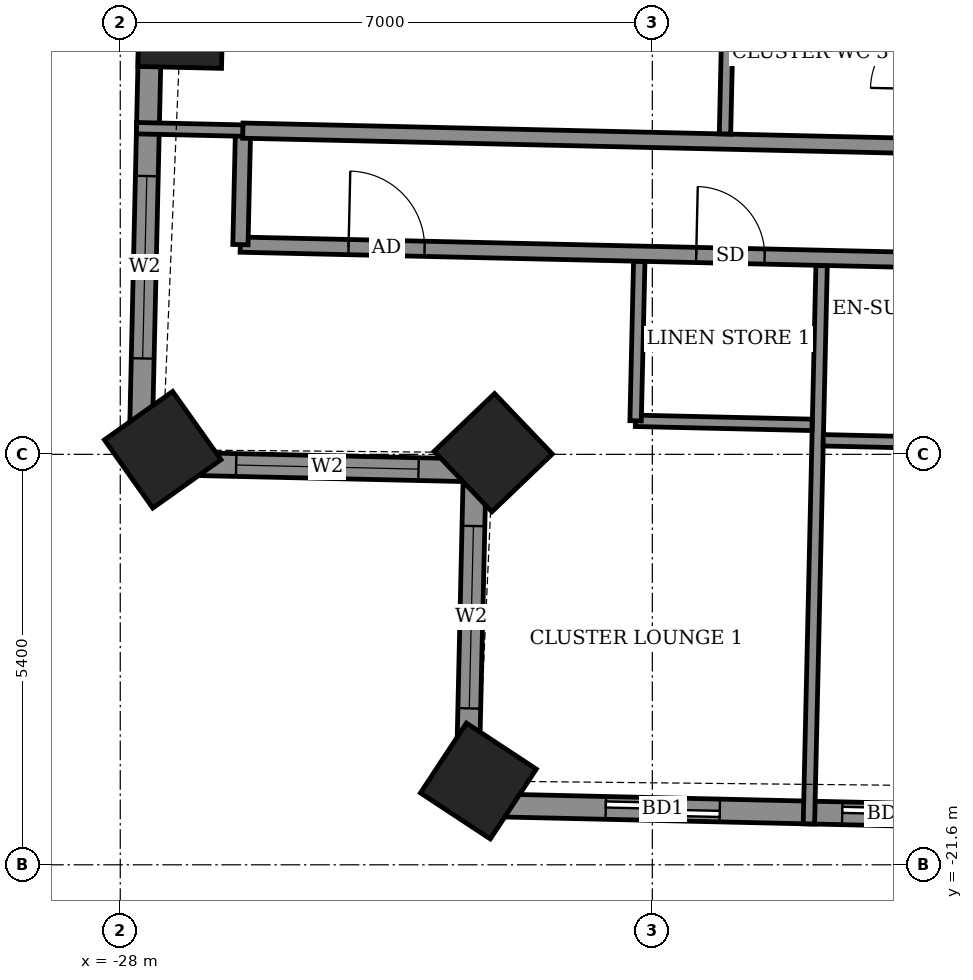
"""IFC4 building model, lengths in metres.
Left out: names, types, materials, properties, quantities, classifications, styles, units other than length and angle.
Written with IfcOpenShell. Run it as: python <this file> out.ifc"""

import sys

from ifc_helpers import new_model, si_unit, direction, frame, frame_2d, origin, origin_2d, place, context, subcontext, project, spatial, rectangle, extrude, element, fill, save


model = new_model("IFC4")
c1 = context("Model", 3, precision=1e-05, world=origin(), true_north=direction((0.0, 1.0)))
c2 = subcontext(c1, "Body", "Model", "MODEL_VIEW")
j1 = project(units=[si_unit("LENGTHUNIT", "METRE"), si_unit("PLANEANGLEUNIT", "RADIAN")], contexts=[c1])
p1 = place(None, origin())
s1 = spatial("IfcSite", under=j1, at=p1, CompositionType="ELEMENT")
p2 = place(p1, origin())
s2 = spatial("IfcBuilding", under=s1, at=p2, CompositionType="ELEMENT")
p3 = place(p2, frame((0.0, 0.0, 212.3)))
s3 = spatial("IfcBuildingStorey", under=s2, at=p3, CompositionType="ELEMENT", Elevation=212.3)
for number, where, z_axis, x_axis in (
    (1, (-27.205, -10.56, -0.55), (0.0, 0.0, 1.0), (-0.023, -1.0, 0.0)),
    (2, (-27.441, -16.14, -0.55), (0.0, 0.0, 1.0), (0.579, -0.816, 0.0)),
    (3, (-23.093, -16.178, -0.55), (0.0, 0.0, 1.0), (0.691, -0.723, 0.0)),
    (4, (-23.289, -20.498, -0.55), (0.0, 0.0, 1.0), (0.835, -0.55, 0.0)),
):
    element("IfcColumn", number, at=place(p3, frame(where, z_axis=z_axis, x_axis=x_axis)), inside=s3, PredefinedType="COLUMN", context=c2, shape_type="SweptSolid", body=[
        extrude(rectangle(XDim=1.1, YDim=1.1, at=origin_2d()), origin(), (0.0, 0.0, 1.0), 3.6),
    ])
p4 = place(p3, frame((-27.459, -4.091, 0.0), z_axis=(0.0, 0.0, 1.0), x_axis=(-0.022668325129, -0.999743040504, 0.0)))
e5 = element("IfcWall", 5, at=p4, inside=s3, PredefinedType="SOLIDWALL", context=c2, shape_type="SweptSolid", body=[
    extrude(rectangle(XDim=12.224, YDim=0.3, at=frame_2d((6.112, 0.0))), origin(), (0.0, 0.0, 1.0), 2.55),
])
p5 = place(p4, frame((1.462, 0.0, 0.0)))
e6 = element("IfcOpeningElement", 6, at=p5, cuts=e5, PredefinedType="OPENING", context=c2, shape_type="SweptSolid", body=[
    extrude(rectangle(XDim=1.5, YDim=2.4, at=frame_2d((0.75, 1.2))), frame((0.0, 0.16, 0.0), z_axis=(0.0, -1.0, 0.0), x_axis=(1.0, 0.0, 0.0)), (0.0, 0.0, 1.0), 0.32),
])
p6 = place(p4, frame((4.243, 0.0, 0.9)))
e7 = element("IfcOpeningElement", 7, at=p6, cuts=e5, PredefinedType="OPENING", context=c2, shape_type="SweptSolid", body=[
    extrude(rectangle(XDim=1.2, YDim=1.5, at=frame_2d((0.6, 0.75))), frame((0.0, 0.16, 0.0), z_axis=(0.0, -1.0, 0.0), x_axis=(1.0, 0.0, 0.0)), (0.0, 0.0, 1.0), 0.32),
])
p7 = place(p4, frame((8.45, 0.0, 0.9)))
e8 = element("IfcOpeningElement", 8, at=p7, cuts=e5, PredefinedType="OPENING", context=c2, shape_type="SweptSolid", body=[
    extrude(rectangle(XDim=2.4, YDim=1.5, at=frame_2d((1.2, 0.75))), frame((0.0, 0.16, 0.0), z_axis=(0.0, -1.0, 0.0), x_axis=(1.0, 0.0, 0.0)), (0.0, 0.0, 1.0), 0.32),
])
p8 = place(p3, frame((-27.736, -16.312, 0.0), z_axis=(0.0, 0.0, 1.0), x_axis=(0.999747504193, -0.022470599878, 0.0)))
e9 = element("IfcWall", 9, at=p8, inside=s3, PredefinedType="SOLIDWALL", context=c2, shape_type="SweptSolid", body=[
    extrude(rectangle(XDim=4.4, YDim=0.3, at=frame_2d((2.2, 0.0))), origin(), (0.0, 0.0, 1.0), 2.55),
])
p9 = place(p8, frame((1.261, 0.0, 0.9)))
e10 = element("IfcOpeningElement", 10, at=p9, cuts=e9, PredefinedType="OPENING", context=c2, shape_type="SweptSolid", body=[
    extrude(rectangle(XDim=2.4, YDim=1.5, at=frame_2d((1.2, 0.75))), frame((0.0, 0.16, 0.0), z_axis=(0.0, -1.0, 0.0), x_axis=(1.0, 0.0, 0.0)), (0.0, 0.0, 1.0), 0.32),
])
p10 = place(p3, frame((-23.337, -16.411, 0.0), z_axis=(0.0, 0.0, 1.0), x_axis=(-0.022747872013, -0.999741233679, 0.0)))
e11 = element("IfcWall", 11, at=p10, inside=s3, PredefinedType="SOLIDWALL", context=c2, shape_type="SweptSolid", body=[
    extrude(rectangle(XDim=4.4, YDim=0.3, at=frame_2d((2.2, 0.0))), origin(), (0.0, 0.0, 1.0), 2.55),
])
p11 = place(p10, frame((0.732, 0.0, 0.9)))
e12 = element("IfcOpeningElement", 12, at=p11, cuts=e11, PredefinedType="OPENING", context=c2, shape_type="SweptSolid", body=[
    extrude(rectangle(XDim=2.4, YDim=1.5, at=frame_2d((1.2, 0.75))), frame((0.0, 0.16, 0.0), z_axis=(0.0, -1.0, 0.0), x_axis=(1.0, 0.0, 0.0)), (0.0, 0.0, 1.0), 0.32),
])
p12 = place(p3, frame((-23.437, -20.81, 0.0), z_axis=(0.0, 0.0, 1.0), x_axis=(0.999742269115, -0.022702320244, 0.0)))
e13 = element("IfcWall", 13, at=p12, inside=s3, PredefinedType="SOLIDWALL", context=c2, shape_type="SweptSolid", body=[
    extrude(rectangle(XDim=41.844, YDim=0.3, at=frame_2d((20.922, 0.0))), origin(), (0.0, 0.0, 1.0), 2.55),
])
p13 = place(p12, frame((1.825, 0.0, 0.0)))
e14 = element("IfcOpeningElement", 14, at=p13, cuts=e13, PredefinedType="OPENING", context=c2, shape_type="SweptSolid", body=[
    extrude(rectangle(XDim=1.5, YDim=2.4, at=frame_2d((0.75, 1.2))), frame((0.0, 0.16, 0.0), z_axis=(0.0, -1.0, 0.0), x_axis=(1.0, 0.0, 0.0)), (0.0, 0.0, 1.0), 0.32),
])
p14 = place(p12, frame((4.937, 0.0, 0.0)))
e15 = element("IfcOpeningElement", 15, at=p14, cuts=e13, PredefinedType="OPENING", context=c2, shape_type="SweptSolid", body=[
    extrude(rectangle(XDim=1.2, YDim=2.4, at=frame_2d((0.6, 1.2))), frame((0.0, 0.16, 0.0), z_axis=(0.0, -1.0, 0.0), x_axis=(1.0, 0.0, 0.0)), (0.0, 0.0, 1.0), 0.32),
])
p15 = place(p12, frame((10.3, 0.0, 0.0)))
e16 = element("IfcOpeningElement", 16, at=p15, cuts=e13, PredefinedType="OPENING", context=c2, shape_type="SweptSolid", body=[
    extrude(rectangle(XDim=1.5, YDim=2.4, at=frame_2d((0.75, 1.2))), frame((0.0, 0.16, 0.0), z_axis=(0.0, -1.0, 0.0), x_axis=(1.0, 0.0, 0.0)), (0.0, 0.0, 1.0), 0.32),
])
p16 = place(p12, frame((15.224, 0.0, 0.0)))
e17 = element("IfcOpeningElement", 17, at=p16, cuts=e13, PredefinedType="OPENING", context=c2, shape_type="SweptSolid", body=[
    extrude(rectangle(XDim=1.5, YDim=2.4, at=frame_2d((0.75, 1.2))), frame((0.0, 0.16, 0.0), z_axis=(0.0, -1.0, 0.0), x_axis=(1.0, 0.0, 0.0)), (0.0, 0.0, 1.0), 0.32),
])
p17 = place(p12, frame((18.436, 0.0, 0.0)))
e18 = element("IfcOpeningElement", 18, at=p17, cuts=e13, PredefinedType="OPENING", context=c2, shape_type="SweptSolid", body=[
    extrude(rectangle(XDim=1.5, YDim=2.4, at=frame_2d((0.75, 1.2))), frame((0.0, 0.16, 0.0), z_axis=(0.0, -1.0, 0.0), x_axis=(1.0, 0.0, 0.0)), (0.0, 0.0, 1.0), 0.32),
])
p18 = place(p12, frame((23.825, 0.0, 0.0)))
e19 = element("IfcOpeningElement", 19, at=p18, cuts=e13, PredefinedType="OPENING", context=c2, shape_type="SweptSolid", body=[
    extrude(rectangle(XDim=1.5, YDim=2.4, at=frame_2d((0.75, 1.2))), frame((0.0, 0.16, 0.0), z_axis=(0.0, -1.0, 0.0), x_axis=(1.0, 0.0, 0.0)), (0.0, 0.0, 1.0), 0.32),
])
p19 = place(p12, frame((28.948, 0.0, 0.0)))
e20 = element("IfcOpeningElement", 20, at=p19, cuts=e13, PredefinedType="OPENING", context=c2, shape_type="SweptSolid", body=[
    extrude(rectangle(XDim=1.5, YDim=2.4, at=frame_2d((0.75, 1.2))), frame((0.0, 0.16, 0.0), z_axis=(0.0, -1.0, 0.0), x_axis=(1.0, 0.0, 0.0)), (0.0, 0.0, 1.0), 0.32),
])
p20 = place(p12, frame((32.16, 0.0, 0.0)))
e21 = element("IfcOpeningElement", 21, at=p20, cuts=e13, PredefinedType="OPENING", context=c2, shape_type="SweptSolid", body=[
    extrude(rectangle(XDim=1.5, YDim=2.4, at=frame_2d((0.75, 1.2))), frame((0.0, 0.16, 0.0), z_axis=(0.0, -1.0, 0.0), x_axis=(1.0, 0.0, 0.0)), (0.0, 0.0, 1.0), 0.32),
])
p21 = place(p12, frame((37.224, 0.0, 0.9)))
e22 = element("IfcOpeningElement", 22, at=p21, cuts=e13, PredefinedType="OPENING", context=c2, shape_type="SweptSolid", body=[
    extrude(rectangle(XDim=2.4, YDim=1.5, at=frame_2d((1.2, 0.75))), frame((0.0, 0.16, 0.0), z_axis=(0.0, -1.0, 0.0), x_axis=(1.0, 0.0, 0.0)), (0.0, 0.0, 1.0), 0.32),
])
p22 = place(p3, frame((-18.94, -21.062, 0.0), z_axis=(0.0, 0.0, 1.0), x_axis=(0.022720650804, 0.999741852694, 0.0)))
e23 = element("IfcWall", 23, at=p22, inside=s3, PredefinedType="PARTITIONING", context=c2, shape_type="SweptSolid", body=[
    extrude(rectangle(XDim=7.35, YDim=0.15, at=frame_2d((3.675, 0.0))), origin(), (0.0, 0.0, 1.0), 2.55),
])
for number, where, z_axis, x_axis in (
    (24, (-18.752, -16.015, 0.0), (0.0, 0.0, 1.0), (1.0, -0.023, 0.0)),
    (25, (-21.222, -15.759, 0.0), (0.0, 0.0, 1.0), (1.0, -0.023, 0.0)),
):
    element("IfcWall", number, at=place(p3, frame(where, z_axis=z_axis, x_axis=x_axis)), inside=s3, PredefinedType="PARTITIONING", context=c2, shape_type="SweptSolid", body=[
        extrude(rectangle(XDim=2.324, YDim=0.15, at=frame_2d((1.162, 0.0))), origin(), (0.0, 0.0, 1.0), 3.05),
    ])
p23 = place(p3, frame((-21.22, -15.759, 0.0), z_axis=(0.0, 0.0, 1.0), x_axis=(0.02279007832, 0.999740272436, 0.0)))
e26 = element("IfcWall", 26, at=p23, inside=s3, PredefinedType="PARTITIONING", context=c2, shape_type="SweptSolid", body=[
    extrude(rectangle(XDim=2.1, YDim=0.15, at=frame_2d((1.05, 0.0))), origin(), (0.0, 0.0, 1.0), 3.05),
])
p24 = place(p3, frame((-26.421, -13.441, 0.0), z_axis=(0.0, 0.0, 1.0), x_axis=(0.999742754064, -0.022680954485, 0.0)))
e27 = element("IfcWall", 27, at=p24, inside=s3, PredefinedType="PARTITIONING", context=c2, shape_type="SweptSolid", body=[
    extrude(rectangle(XDim=48.945, YDim=0.2, at=frame_2d((24.472, 0.0))), origin(), (0.0, 0.0, 1.0), 3.05),
])
p25 = place(p24, frame((1.425, 0.0, 0.0)))
e28 = element("IfcOpeningElement", 28, at=p25, cuts=e27, PredefinedType="OPENING", context=c2, shape_type="SweptSolid", body=[
    extrude(rectangle(XDim=1.0, YDim=2.1, at=frame_2d((0.5, 1.05))), frame((0.0, 0.11, 0.0), z_axis=(0.0, -1.0, 0.0), x_axis=(1.0, 0.0, 0.0)), (0.0, 0.0, 1.0), 0.22),
])
p26 = place(p24, frame((6.0, 0.0, 0.0)))
e29 = element("IfcOpeningElement", 29, at=p26, cuts=e27, PredefinedType="OPENING", context=c2, shape_type="SweptSolid", body=[
    extrude(rectangle(XDim=0.9, YDim=2.1, at=frame_2d((0.45, 1.05))), frame((0.0, 0.11, 0.0), z_axis=(0.0, -1.0, 0.0), x_axis=(1.0, 0.0, 0.0)), (0.0, 0.0, 1.0), 0.22),
])
p27 = place(p24, frame((10.55, 0.0, 0.0)))
e30 = element("IfcOpeningElement", 30, at=p27, cuts=e27, PredefinedType="OPENING", context=c2, shape_type="SweptSolid", body=[
    extrude(rectangle(XDim=0.9, YDim=2.1, at=frame_2d((0.45, 1.05))), frame((0.0, 0.11, 0.0), z_axis=(0.0, -1.0, 0.0), x_axis=(1.0, 0.0, 0.0)), (0.0, 0.0, 1.0), 0.22),
])
p28 = place(p24, frame((12.55, 0.0, 0.0)))
e31 = element("IfcOpeningElement", 31, at=p28, cuts=e27, PredefinedType="OPENING", context=c2, shape_type="SweptSolid", body=[
    extrude(rectangle(XDim=0.9, YDim=2.1, at=frame_2d((0.45, 1.05))), frame((0.0, 0.11, 0.0), z_axis=(0.0, -1.0, 0.0), x_axis=(1.0, 0.0, 0.0)), (0.0, 0.0, 1.0), 0.22),
])
p29 = place(p24, frame((19.425, 0.0, 0.0)))
e32 = element("IfcOpeningElement", 32, at=p29, cuts=e27, PredefinedType="OPENING", context=c2, shape_type="SweptSolid", body=[
    extrude(rectangle(XDim=0.9, YDim=2.1, at=frame_2d((0.45, 1.05))), frame((0.0, 0.11, 0.0), z_axis=(0.0, -1.0, 0.0), x_axis=(1.0, 0.0, 0.0)), (0.0, 0.0, 1.0), 0.22),
])
p30 = place(p24, frame((21.525, 0.0, 0.0)))
e33 = element("IfcOpeningElement", 33, at=p30, cuts=e27, PredefinedType="OPENING", context=c2, shape_type="SweptSolid", body=[
    extrude(rectangle(XDim=0.9, YDim=2.1, at=frame_2d((0.45, 1.05))), frame((0.0, 0.11, 0.0), z_axis=(0.0, -1.0, 0.0), x_axis=(1.0, 0.0, 0.0)), (0.0, 0.0, 1.0), 0.22),
])
p31 = place(p24, frame((28.475, 0.0, 0.0)))
e34 = element("IfcOpeningElement", 34, at=p31, cuts=e27, PredefinedType="OPENING", context=c2, shape_type="SweptSolid", body=[
    extrude(rectangle(XDim=0.9, YDim=2.1, at=frame_2d((0.45, 1.05))), frame((0.0, 0.11, 0.0), z_axis=(0.0, -1.0, 0.0), x_axis=(1.0, 0.0, 0.0)), (0.0, 0.0, 1.0), 0.22),
])
p32 = place(p24, frame((30.5, 0.0, 0.0)))
e35 = element("IfcOpeningElement", 35, at=p32, cuts=e27, PredefinedType="OPENING", context=c2, shape_type="SweptSolid", body=[
    extrude(rectangle(XDim=0.9, YDim=2.1, at=frame_2d((0.45, 1.05))), frame((0.0, 0.11, 0.0), z_axis=(0.0, -1.0, 0.0), x_axis=(1.0, 0.0, 0.0)), (0.0, 0.0, 1.0), 0.22),
])
p33 = place(p24, frame((37.35, 0.0, 0.0)))
e36 = element("IfcOpeningElement", 36, at=p33, cuts=e27, PredefinedType="OPENING", context=c2, shape_type="SweptSolid", body=[
    extrude(rectangle(XDim=0.9, YDim=2.1, at=frame_2d((0.45, 1.05))), frame((0.0, 0.11, 0.0), z_axis=(0.0, -1.0, 0.0), x_axis=(1.0, 0.0, 0.0)), (0.0, 0.0, 1.0), 0.22),
])
p34 = place(p24, frame((45.422, 0.0, 0.0)))
e37 = element("IfcOpeningElement", 37, at=p34, cuts=e27, PredefinedType="OPENING", context=c2, shape_type="SweptSolid", body=[
    extrude(rectangle(XDim=1.0, YDim=2.1, at=frame_2d((0.5, 1.05))), frame((0.0, 0.11, 0.0), z_axis=(0.0, -1.0, 0.0), x_axis=(1.0, 0.0, 0.0)), (0.0, 0.0, 1.0), 0.22),
])
p35 = place(p24, frame((39.75, 0.0, 0.0)))
e38 = element("IfcOpeningElement", 38, at=p35, cuts=e27, PredefinedType="OPENING", context=c2, shape_type="SweptSolid", body=[
    extrude(rectangle(XDim=0.9, YDim=2.1, at=frame_2d((0.45, 1.05))), frame((0.0, 0.11, 0.0), z_axis=(0.0, -1.0, 0.0), x_axis=(1.0, 0.0, 0.0)), (0.0, 0.0, 1.0), 0.22),
])
p36 = place(p3, frame((-26.419, -13.441, 0.0), z_axis=(0.0, 0.0, 1.0), x_axis=(0.022617910375, 0.999744182344, 0.0)))
e39 = element("IfcWall", 39, at=p36, inside=s3, PredefinedType="PARTITIONING", context=c2, shape_type="SweptSolid", body=[
    extrude(rectangle(XDim=1.5, YDim=0.2, at=frame_2d((0.75, 0.0))), origin(), (0.0, 0.0, 1.0), 3.05),
])
p37 = place(p3, frame((-27.786, -11.909, 0.0), z_axis=(0.0, 0.0, 1.0), x_axis=(0.999740216184, -0.022792545827, 0.0)))
e40 = element("IfcWall", 40, at=p37, inside=s3, PredefinedType="PARTITIONING", context=c2, shape_type="SweptSolid", body=[
    extrude(rectangle(XDim=1.403, YDim=0.15, at=frame_2d((0.702, 0.0))), origin(), (0.0, 0.0, 1.0), 2.55),
])
p38 = place(p3, frame((-26.387, -11.941, 0.0), z_axis=(0.0, 0.0, 1.0), x_axis=(0.999741076645, -0.022754772455, 0.0)))
e41 = element("IfcWall", 41, at=p38, inside=s3, PredefinedType="PARTITIONING", context=c2, shape_type="SweptSolid", body=[
    extrude(rectangle(XDim=9.141, YDim=0.2, at=frame_2d((4.571, 0.0))), origin(), (0.0, 0.0, 1.0), 3.05),
])
p39 = place(p3, frame((-20.044, -11.985, 0.0), z_axis=(0.0, 0.0, 1.0), x_axis=(0.022612884682, 0.999744296031, 0.0)))
e42 = element("IfcWall", 42, at=p39, inside=s3, PredefinedType="PARTITIONING", context=c2, shape_type="SweptSolid", body=[
    extrude(rectangle(XDim=2.3, YDim=0.15, at=frame_2d((1.15, 0.0))), origin(), (0.0, 0.0, 1.0), 3.05),
])
p40 = place(p7, origin())
e43 = element("IfcWindow", 43, at=p40, inside=s3, PartitioningType="DOUBLE_PANEL_VERTICAL", PredefinedType="WINDOW", context=c2, shape_type="SweptSolid", body=[
    extrude(rectangle(XDim=2.4, YDim=1.5, at=frame_2d((1.2, 0.75))), frame((0.0, 0.03, 0.0), z_axis=(0.0, -1.0, 0.0), x_axis=(1.0, 0.0, 0.0)), (0.0, 0.0, 1.0), 0.06),
])
fill(e8, e43)
p41 = place(p9, origin())
e44 = element("IfcWindow", 44, at=p41, inside=s3, PartitioningType="DOUBLE_PANEL_VERTICAL", PredefinedType="WINDOW", context=c2, shape_type="SweptSolid", body=[
    extrude(rectangle(XDim=2.4, YDim=1.5, at=frame_2d((1.2, 0.75))), frame((0.0, 0.03, 0.0), z_axis=(0.0, -1.0, 0.0), x_axis=(1.0, 0.0, 0.0)), (0.0, 0.0, 1.0), 0.06),
])
fill(e10, e44)
p42 = place(p11, origin())
e45 = element("IfcWindow", 45, at=p42, inside=s3, PartitioningType="DOUBLE_PANEL_VERTICAL", PredefinedType="WINDOW", context=c2, shape_type="SweptSolid", body=[
    extrude(rectangle(XDim=2.4, YDim=1.5, at=frame_2d((1.2, 0.75))), frame((0.0, 0.03, 0.0), z_axis=(0.0, -1.0, 0.0), x_axis=(1.0, 0.0, 0.0)), (0.0, 0.0, 1.0), 0.06),
])
fill(e12, e45)
p43 = place(p13, origin())
e46 = element("IfcDoor", 46, at=p43, inside=s3, OperationType="SLIDING_TO_LEFT", PredefinedType="DOOR", context=c2, shape_type="SweptSolid", body=[
    extrude(rectangle(XDim=1.5, YDim=2.4, at=frame_2d((0.75, 1.2))), frame((0.0, 0.025, 0.0), z_axis=(0.0, -1.0, 0.0), x_axis=(1.0, 0.0, 0.0)), (0.0, 0.0, 1.0), 0.05),
])
fill(e14, e46)
p44 = place(p14, origin())
e47 = element("IfcDoor", 47, at=p44, inside=s3, OperationType="SLIDING_TO_LEFT", PredefinedType="DOOR", context=c2, shape_type="SweptSolid", body=[
    extrude(rectangle(XDim=1.2, YDim=2.4, at=frame_2d((0.6, 1.2))), frame((0.0, 0.025, 0.0), z_axis=(0.0, -1.0, 0.0), x_axis=(1.0, 0.0, 0.0)), (0.0, 0.0, 1.0), 0.05),
])
fill(e15, e47)
p45 = place(p25, origin())
e48 = element("IfcDoor", 48, at=p45, inside=s3, OperationType="SINGLE_SWING_LEFT", PredefinedType="DOOR", context=c2, shape_type="SweptSolid", body=[
    extrude(rectangle(XDim=1.0, YDim=2.1, at=frame_2d((0.5, 1.05))), frame((0.0, 0.025, 0.0), z_axis=(0.0, -1.0, 0.0), x_axis=(1.0, 0.0, 0.0)), (0.0, 0.0, 1.0), 0.05),
])
fill(e28, e48)
p46 = place(p26, origin())
e49 = element("IfcDoor", 49, at=p46, inside=s3, OperationType="SINGLE_SWING_LEFT", PredefinedType="DOOR", context=c2, shape_type="SweptSolid", body=[
    extrude(rectangle(XDim=0.9, YDim=2.1, at=frame_2d((0.45, 1.05))), frame((0.0, 0.025, 0.0), z_axis=(0.0, -1.0, 0.0), x_axis=(1.0, 0.0, 0.0)), (0.0, 0.0, 1.0), 0.05),
])
fill(e29, e49)
save(model, sys.argv[1])
